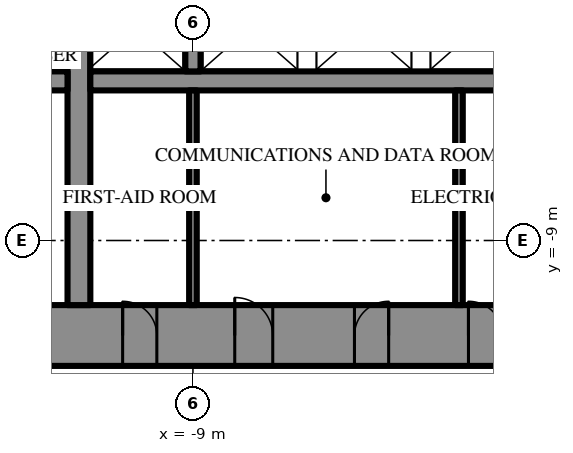
"""IFC4 building model, lengths in metres.
Left out: names, types, materials, properties, quantities, classifications, styles, units other than length and angle.
Written with IfcOpenShell. Run it as: python <this file> out.ifc"""

import sys

from ifc_helpers import new_model, si_unit, direction, frame, frame_2d, origin, place, context, subcontext, project, spatial, rectangle, extrude, element, fill, save


model = new_model("IFC4")
c1 = context("Model", 3, precision=1e-05, world=origin(), true_north=direction((0.0, 1.0)))
c2 = subcontext(c1, "Body", "Model", "MODEL_VIEW")
j1 = project(units=[si_unit("LENGTHUNIT", "METRE"), si_unit("PLANEANGLEUNIT", "RADIAN")], contexts=[c1])
p1 = place(None, origin())
s1 = spatial("IfcSite", under=j1, at=p1, CompositionType="ELEMENT")
p2 = place(p1, origin())
s2 = spatial("IfcBuilding", under=s1, at=p2, CompositionType="ELEMENT")
p3 = place(p2, frame((0.0, 0.0, 253.3)))
s3 = spatial("IfcBuildingStorey", under=s2, at=p3, CompositionType="ELEMENT", Elevation=253.3)
p4 = place(p3, frame((15.5, -11.5, 0.0), z_axis=(0.0, 0.0, 1.0), x_axis=(-1.0, 0.0, 0.0)))
e1 = element("IfcWall", 1, at=p4, inside=s3, PredefinedType="SHEAR", context=c2, shape_type="SweptSolid", body=[
    extrude(rectangle(XDim=31.0, YDim=1.6, at=frame_2d((15.5, 0.0))), origin(), (0.0, 0.0, 1.0), 4.2),
])
p5 = place(p4, frame((16.35, 0.0, 0.0)))
e2 = element("IfcOpeningElement", 2, at=p5, cuts=e1, PredefinedType="OPENING", context=c2, shape_type="SweptSolid", body=[
    extrude(rectangle(XDim=0.9, YDim=2.2, at=frame_2d((0.45, 1.1))), frame((0.0, 0.81, 0.0), z_axis=(0.0, -1.0, 0.0), x_axis=(1.0, 0.0, 0.0)), (0.0, 0.0, 1.0), 1.62),
])
p6 = place(p4, frame((19.35, 0.0, 0.0)))
e3 = element("IfcOpeningElement", 3, at=p6, cuts=e1, PredefinedType="OPENING", context=c2, shape_type="SweptSolid", body=[
    extrude(rectangle(XDim=0.9, YDim=2.2, at=frame_2d((0.45, 1.1))), frame((0.0, 0.81, 0.0), z_axis=(0.0, -1.0, 0.0), x_axis=(1.0, 0.0, 0.0)), (0.0, 0.0, 1.0), 1.62),
])
p7 = place(p4, frame((22.4, 0.0, 0.0)))
e4 = element("IfcOpeningElement", 4, at=p7, cuts=e1, PredefinedType="OPENING", context=c2, shape_type="SweptSolid", body=[
    extrude(rectangle(XDim=1.0, YDim=2.2, at=frame_2d((0.5, 1.1))), frame((0.0, 0.81, 0.0), z_axis=(0.0, -1.0, 0.0), x_axis=(1.0, 0.0, 0.0)), (0.0, 0.0, 1.0), 1.62),
])
p8 = place(p4, frame((1.65, 0.0, 0.0)))
e5 = element("IfcOpeningElement", 5, at=p8, cuts=e1, PredefinedType="OPENING", context=c2, shape_type="SweptSolid", body=[
    extrude(rectangle(XDim=0.9, YDim=2.2, at=frame_2d((0.45, 1.1))), frame((0.0, 0.81, 0.0), z_axis=(0.0, -1.0, 0.0), x_axis=(1.0, 0.0, 0.0)), (0.0, 0.0, 1.0), 1.62),
])
p9 = place(p4, frame((4.65, 0.0, 0.0)))
e6 = element("IfcOpeningElement", 6, at=p9, cuts=e1, PredefinedType="OPENING", context=c2, shape_type="SweptSolid", body=[
    extrude(rectangle(XDim=0.9, YDim=2.2, at=frame_2d((0.45, 1.1))), frame((0.0, 0.81, 0.0), z_axis=(0.0, -1.0, 0.0), x_axis=(1.0, 0.0, 0.0)), (0.0, 0.0, 1.0), 1.62),
])
p10 = place(p4, frame((25.45, 0.0, 0.0)))
e7 = element("IfcOpeningElement", 7, at=p10, cuts=e1, PredefinedType="OPENING", context=c2, shape_type="SweptSolid", body=[
    extrude(rectangle(XDim=0.9, YDim=2.2, at=frame_2d((0.45, 1.1))), frame((0.0, 0.81, 0.0), z_axis=(0.0, -1.0, 0.0), x_axis=(1.0, 0.0, 0.0)), (0.0, 0.0, 1.0), 1.62),
])
p11 = place(p4, frame((28.45, 0.0, 0.0)))
e8 = element("IfcOpeningElement", 8, at=p11, cuts=e1, PredefinedType="OPENING", context=c2, shape_type="SweptSolid", body=[
    extrude(rectangle(XDim=0.9, YDim=2.2, at=frame_2d((0.45, 1.1))), frame((0.0, 0.81, 0.0), z_axis=(0.0, -1.0, 0.0), x_axis=(1.0, 0.0, 0.0)), (0.0, 0.0, 1.0), 1.62),
])
p12 = place(p3, frame((-12.0, -10.7, 0.0), z_axis=(0.0, 0.0, 1.0), x_axis=(0.0, 1.0, 0.0)))
e9 = element("IfcWall", 9, at=p12, inside=s3, PredefinedType="SHEAR", context=c2, shape_type="SweptSolid", body=[
    extrude(rectangle(XDim=21.4, YDim=0.6, at=frame_2d((10.7, 0.0))), origin(), (0.0, 0.0, 1.0), 4.2),
])
p13 = place(p12, frame((9.8, 0.0, 0.0)))
e10 = element("IfcOpeningElement", 10, at=p13, cuts=e9, PredefinedType="OPENING", context=c2, shape_type="SweptSolid", body=[
    extrude(rectangle(XDim=1.8, YDim=2.4, at=frame_2d((0.9, 1.2))), frame((0.0, 0.31, 0.0), z_axis=(0.0, -1.0, 0.0), x_axis=(1.0, 0.0, 0.0)), (0.0, 0.0, 1.0), 0.62),
])
p14 = place(p3, frame((11.7, -4.8, 0.0), z_axis=(0.0, 0.0, 1.0), x_axis=(-1.0, 0.0, 0.0)))
e11 = element("IfcWall", 11, at=p14, inside=s3, PredefinedType="SHEAR", context=c2, shape_type="SweptSolid", body=[
    extrude(rectangle(XDim=23.4, YDim=0.5, at=frame_2d((11.7, 0.0))), origin(), (0.0, 0.0, 1.0), 4.2),
])
p15 = place(p14, frame((6.6, 0.0, 0.0)))
e12 = element("IfcOpeningElement", 12, at=p15, cuts=e11, PredefinedType="OPENING", context=c2, shape_type="SweptSolid", body=[
    extrude(rectangle(XDim=1.2, YDim=2.2, at=frame_2d((0.6, 1.1))), frame((0.0, 0.26, 0.0), z_axis=(0.0, -1.0, 0.0), x_axis=(1.0, 0.0, 0.0)), (0.0, 0.0, 1.0), 0.52),
])
p16 = place(p14, frame((3.6, 0.0, 0.0)))
e13 = element("IfcOpeningElement", 13, at=p16, cuts=e11, PredefinedType="OPENING", context=c2, shape_type="SweptSolid", body=[
    extrude(rectangle(XDim=1.2, YDim=2.2, at=frame_2d((0.6, 1.1))), frame((0.0, 0.26, 0.0), z_axis=(0.0, -1.0, 0.0), x_axis=(1.0, 0.0, 0.0)), (0.0, 0.0, 1.0), 0.52),
])
p17 = place(p3, frame((-12.3, -4.8, 0.0), z_axis=(0.0, 0.0, 1.0), x_axis=(-1.0, 0.0, 0.0)))
e14 = element("IfcWall", 14, at=p17, inside=s3, PredefinedType="SHEAR", context=c2, shape_type="SweptSolid", body=[
    extrude(rectangle(XDim=2.2, YDim=0.5, at=frame_2d((1.1, 0.0))), origin(), (0.0, 0.0, 1.0), 4.2),
])
p18 = place(p3, frame((-9.0, -2.25, 0.0), z_axis=(0.0, 0.0, 1.0), x_axis=(0.0, -1.0, 0.0)))
e15 = element("IfcWall", 15, at=p18, inside=s3, PredefinedType="SHEAR", context=c2, shape_type="SweptSolid", body=[
    extrude(rectangle(XDim=2.3, YDim=0.4, at=frame_2d((1.15, 0.0))), origin(), (0.0, 0.0, 1.0), 4.2),
])
for number, where, z_axis, x_axis in (
    (16, (-9.0, -5.05, 0.0), (0.0, 0.0, 1.0), (0.0, -1.0, 0.0)),
    (17, (-2.0, -5.05, 0.0), (0.0, 0.0, 1.0), (0.0, -1.0, 0.0)),
):
    element("IfcWall", number, at=place(p3, frame(where, z_axis=z_axis, x_axis=x_axis)), inside=s3, PredefinedType="PARTITIONING", context=c2, shape_type="SweptSolid", body=[
        extrude(rectangle(XDim=5.65, YDim=0.2, at=frame_2d((2.825, 0.0))), origin(), (0.0, 0.0, 1.0), 4.0),
    ])
p19 = place(p5, frame((0.9, 0.0, 0.0), z_axis=(0.0, 0.0, 1.0), x_axis=(-1.0, 0.0, 0.0)))
e18 = element("IfcDoor", 18, at=p19, inside=s3, OperationType="SINGLE_SWING_RIGHT", PredefinedType="DOOR", context=c2, shape_type="SweptSolid", body=[
    extrude(rectangle(XDim=0.9, YDim=2.2, at=frame_2d((0.45, 1.1))), frame((0.0, 0.025, 0.0), z_axis=(0.0, -1.0, 0.0), x_axis=(1.0, 0.0, 0.0)), (0.0, 0.0, 1.0), 0.05),
])
fill(e2, e18)
p20 = place(p6, frame((0.9, 0.0, 0.0), z_axis=(0.0, 0.0, 1.0), x_axis=(-1.0, 0.0, 0.0)))
e19 = element("IfcDoor", 19, at=p20, inside=s3, OperationType="SINGLE_SWING_LEFT", PredefinedType="DOOR", context=c2, shape_type="SweptSolid", body=[
    extrude(rectangle(XDim=0.9, YDim=2.2, at=frame_2d((0.45, 1.1))), frame((0.0, 0.025, 0.0), z_axis=(0.0, -1.0, 0.0), x_axis=(1.0, 0.0, 0.0)), (0.0, 0.0, 1.0), 0.05),
])
fill(e3, e19)
p21 = place(p7, frame((1.0, 0.0, 0.0), z_axis=(0.0, 0.0, 1.0), x_axis=(-1.0, 0.0, 0.0)))
e20 = element("IfcDoor", 20, at=p21, inside=s3, OperationType="SINGLE_SWING_RIGHT", PredefinedType="DOOR", context=c2, shape_type="SweptSolid", body=[
    extrude(rectangle(XDim=1.0, YDim=2.2, at=frame_2d((0.5, 1.1))), frame((0.0, 0.025, 0.0), z_axis=(0.0, -1.0, 0.0), x_axis=(1.0, 0.0, 0.0)), (0.0, 0.0, 1.0), 0.05),
])
fill(e4, e20)
p22 = place(p10, frame((0.9, 0.0, 0.0), z_axis=(0.0, 0.0, 1.0), x_axis=(-1.0, 0.0, 0.0)))
e21 = element("IfcDoor", 21, at=p22, inside=s3, OperationType="SINGLE_SWING_RIGHT", PredefinedType="DOOR", context=c2, shape_type="SweptSolid", body=[
    extrude(rectangle(XDim=0.9, YDim=2.2, at=frame_2d((0.45, 1.1))), frame((0.0, 0.025, 0.0), z_axis=(0.0, -1.0, 0.0), x_axis=(1.0, 0.0, 0.0)), (0.0, 0.0, 1.0), 0.05),
])
fill(e7, e21)
save(model, sys.argv[1])
